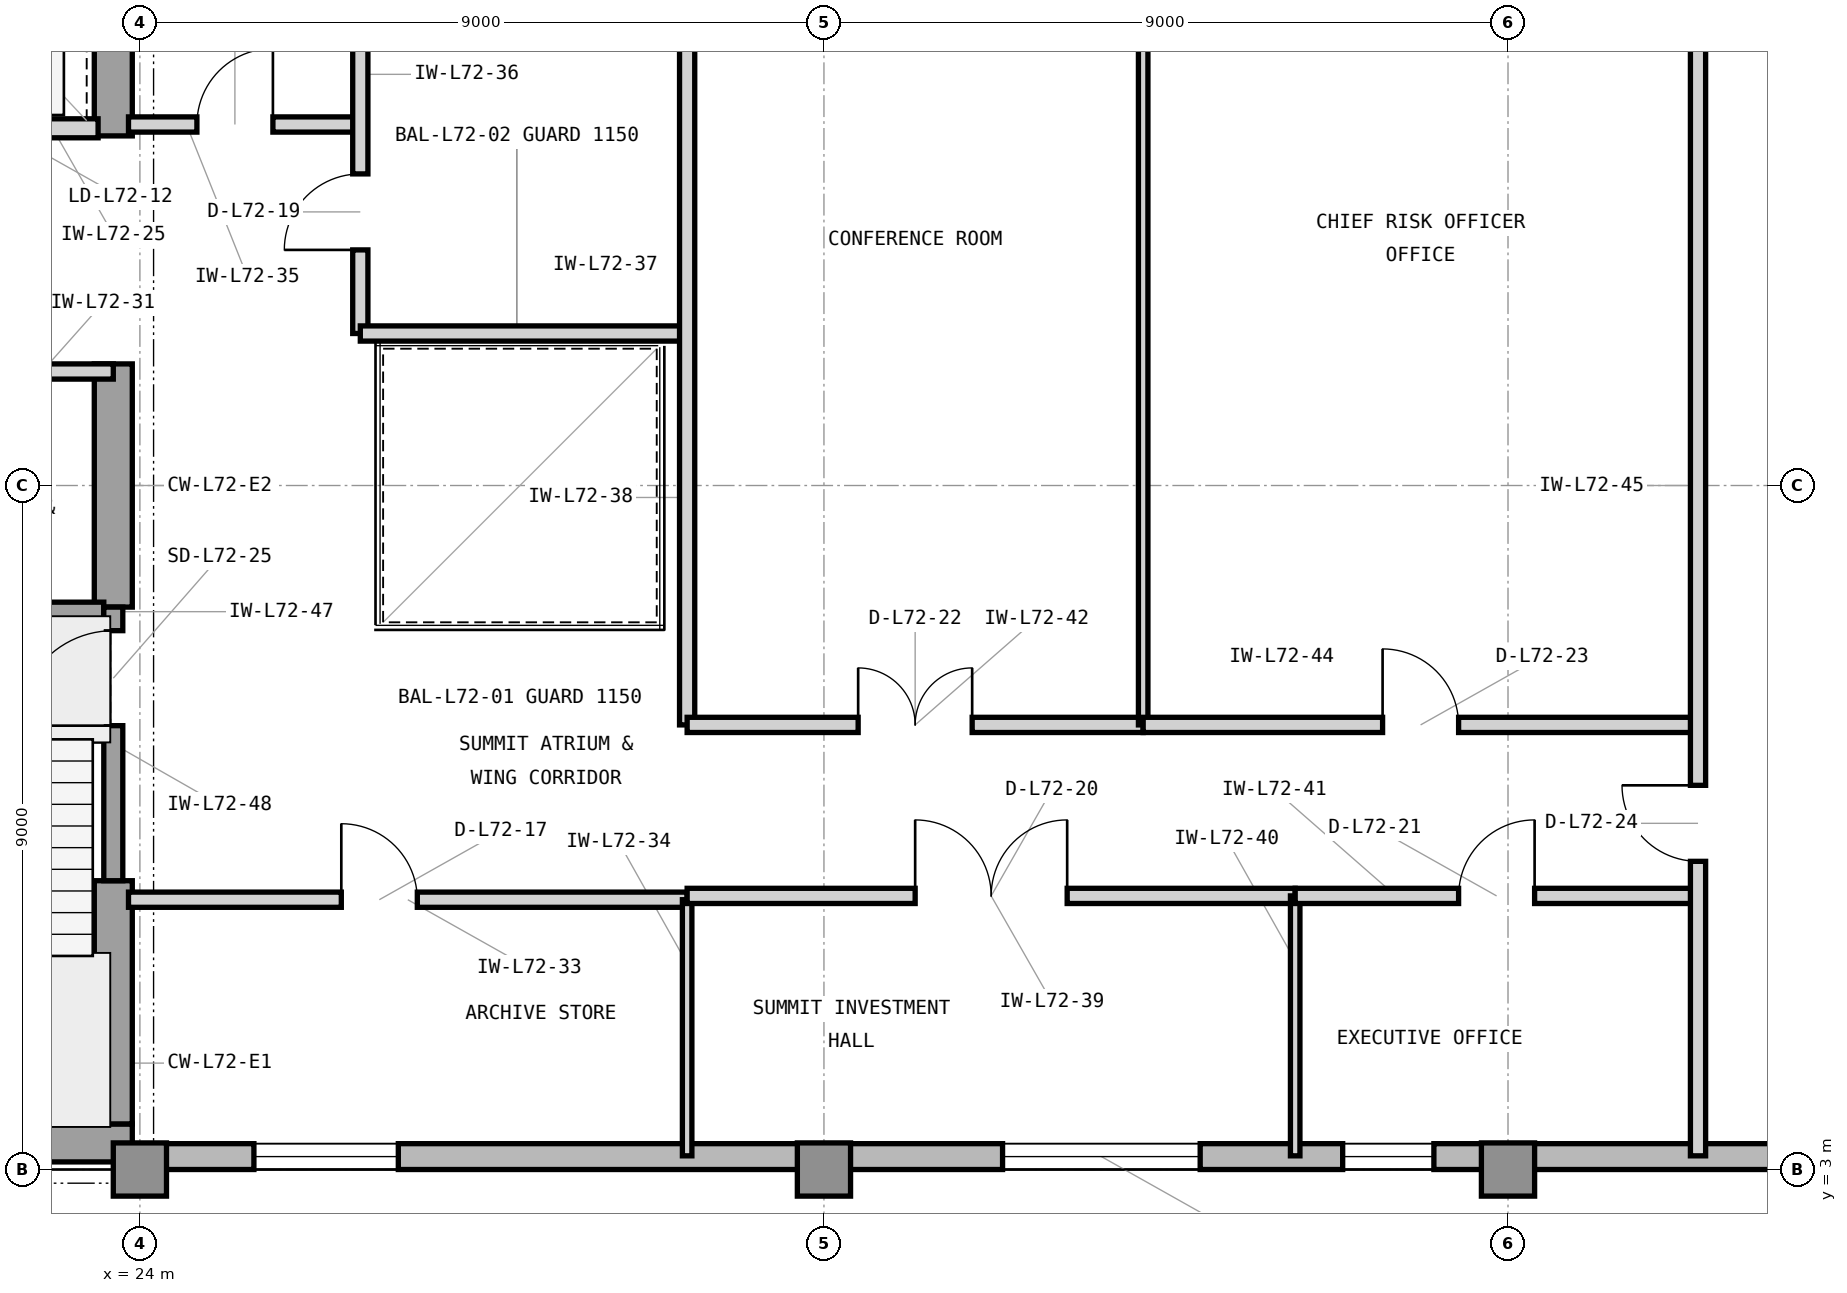
"""IFC4 building model, lengths in metres.
Left out: names, types, materials, properties, quantities, classifications, styles, units other than length and angle.
Written with IfcOpenShell. Run it as: python <this file> out.ifc"""

import sys

from ifc_helpers import new_model, si_unit, direction, frame, frame_2d, origin, origin_2d, place, context, subcontext, project, spatial, rectangle, extrude, element, fill, save


model = new_model("IFC4")
c1 = context("Model", 3, precision=1e-05, world=origin(), true_north=direction((0.0, 1.0)))
c2 = subcontext(c1, "Body", "Model", "MODEL_VIEW")
j1 = project(units=[si_unit("LENGTHUNIT", "METRE"), si_unit("PLANEANGLEUNIT", "RADIAN")], contexts=[c1])
p1 = place(None, origin())
s1 = spatial("IfcSite", under=j1, at=p1, CompositionType="ELEMENT")
p2 = place(p1, origin())
s2 = spatial("IfcBuilding", under=s1, at=p2, CompositionType="ELEMENT")
p3 = place(p2, frame((0.0, 0.0, 293.7)))
s3 = spatial("IfcBuildingStorey", under=s2, at=p3, CompositionType="ELEMENT", Elevation=293.7)
p4 = place(p3, frame((7.475, 3.35, 0.0), z_axis=(0.0, 0.0, 1.0), x_axis=(1.0, 0.0, 0.0)))
e1 = element("IfcWall", 1, at=p4, inside=s3, PredefinedType="SHEAR", context=c2, shape_type="SweptSolid", body=[
    extrude(rectangle(XDim=16.425, YDim=0.5, at=frame_2d((8.212, 0.0))), origin(), (0.0, 0.0, 1.0), 3.9),
])
p5 = place(p3, frame((23.65, 3.6, 0.0), z_axis=(0.0, 0.0, 1.0), x_axis=(0.0, 1.0, 0.0)))
e2 = element("IfcWall", 2, at=p5, inside=s3, PredefinedType="SHEAR", context=c2, shape_type="SweptSolid", body=[
    extrude(rectangle(XDim=3.2, YDim=0.5, at=frame_2d((1.6, 0.0))), origin(), (0.0, 0.0, 1.0), 3.9),
])
p6 = place(p3, frame((23.65, 10.4, 0.0), z_axis=(0.0, 0.0, 1.0), x_axis=(0.0, 1.0, 0.0)))
e3 = element("IfcWall", 3, at=p6, inside=s3, PredefinedType="SHEAR", context=c2, shape_type="SweptSolid", body=[
    extrude(rectangle(XDim=3.2, YDim=0.5, at=frame_2d((1.6, 0.0))), origin(), (0.0, 0.0, 1.0), 3.9),
])
p7 = place(p3, frame((23.65, 16.6, 0.0), z_axis=(0.0, 0.0, 1.0), x_axis=(0.0, 1.0, 0.0)))
e4 = element("IfcWall", 4, at=p7, inside=s3, PredefinedType="SHEAR", context=c2, shape_type="SweptSolid", body=[
    extrude(rectangle(XDim=4.05, YDim=0.5, at=frame_2d((2.025, 0.0))), origin(), (0.0, 0.0, 1.0), 3.9),
])
for number, where, z_axis, x_axis in (
    (5, (24.0, 3.0, 0.0), (0.0, 0.0, 1.0), (1.0, 0.0, 0.0)),
    (6, (33.0, 3.0, 0.0), (0.0, 0.0, 1.0), (1.0, 0.0, 0.0)),
    (7, (42.0, 3.0, 0.0), (0.0, 0.0, 1.0), (1.0, 0.0, 0.0)),
):
    element("IfcColumn", number, at=place(p3, frame(where, z_axis=z_axis, x_axis=x_axis)), inside=s3, PredefinedType="COLUMN", context=c2, shape_type="SweptSolid", body=[
        extrude(rectangle(XDim=0.7, YDim=0.7, at=origin_2d()), origin(), (0.0, 0.0, 1.0), 3.9),
    ])
p8 = place(p3, frame((23.9, 3.17, 0.0), z_axis=(0.0, 0.0, 1.0), x_axis=(1.0, 0.0, 0.0)))
e8 = element("IfcWall", 8, at=p8, inside=s3, PredefinedType="STANDARD", context=c2, shape_type="SweptSolid", body=[
    extrude(rectangle(XDim=25.5, YDim=0.34, at=frame_2d((12.75, 0.0))), origin(), (0.0, 0.0, 1.0), 3.715),
])
p9 = place(p8, frame((1.6, 0.0, 0.8)))
e9 = element("IfcOpeningElement", 9, at=p9, cuts=e8, PredefinedType="OPENING", context=c2, shape_type="SweptSolid", body=[
    extrude(rectangle(XDim=1.9, YDim=2.35, at=frame_2d((0.95, 1.175))), frame((0.0, 0.18, 0.0), z_axis=(0.0, -1.0, 0.0), x_axis=(1.0, 0.0, 0.0)), (0.0, 0.0, 1.0), 0.36),
])
p10 = place(p8, frame((11.45, 0.0, 0.8)))
e10 = element("IfcOpeningElement", 10, at=p10, cuts=e8, PredefinedType="OPENING", context=c2, shape_type="SweptSolid", body=[
    extrude(rectangle(XDim=2.6, YDim=2.35, at=frame_2d((1.3, 1.175))), frame((0.0, 0.18, 0.0), z_axis=(0.0, -1.0, 0.0), x_axis=(1.0, 0.0, 0.0)), (0.0, 0.0, 1.0), 0.36),
])
p11 = place(p8, frame((15.925, 0.0, 0.8)))
e11 = element("IfcOpeningElement", 11, at=p11, cuts=e8, PredefinedType="OPENING", context=c2, shape_type="SweptSolid", body=[
    extrude(rectangle(XDim=1.2, YDim=2.35, at=frame_2d((0.6, 1.175))), frame((0.0, 0.18, 0.0), z_axis=(0.0, -1.0, 0.0), x_axis=(1.0, 0.0, 0.0)), (0.0, 0.0, 1.0), 0.36),
])
p12 = place(p3, frame((21.05, 16.7, 0.0), z_axis=(0.0, 0.0, 1.0), x_axis=(1.0, 0.0, 0.0)))
e12 = element("IfcWall", 12, at=p12, inside=s3, PredefinedType="PARTITIONING", context=c2, shape_type="SweptSolid", body=[
    extrude(rectangle(XDim=2.4, YDim=0.25, at=frame_2d((1.2, 0.0))), origin(), (0.0, 0.0, 1.0), 3.354),
])
p13 = place(p12, frame((0.52, 0.0, 0.0)))
e13 = element("IfcOpeningElement", 13, at=p13, cuts=e12, PredefinedType="OPENING", context=c2, shape_type="SweptSolid", body=[
    extrude(rectangle(XDim=1.15, YDim=2.25, at=frame_2d((0.575, 1.125))), frame((0.0, 0.135, 0.0), z_axis=(0.0, -1.0, 0.0), x_axis=(1.0, 0.0, 0.0)), (0.0, 0.0, 1.0), 0.27),
])
p14 = place(p3, frame((19.9, 13.5, 0.0), z_axis=(0.0, 0.0, 1.0), x_axis=(1.0, 0.0, 0.0)))
e14 = element("IfcWall", 14, at=p14, inside=s3, PredefinedType="PARTITIONING", context=c2, shape_type="SweptSolid", body=[
    extrude(rectangle(XDim=3.75, YDim=0.2, at=frame_2d((1.875, 0.0))), origin(), (0.0, 0.0, 1.0), 3.354),
])
p15 = place(p14, frame((1.4, 0.0, 0.0)))
e15 = element("IfcOpeningElement", 15, at=p15, cuts=e14, PredefinedType="OPENING", context=c2, shape_type="SweptSolid", body=[
    extrude(rectangle(XDim=0.95, YDim=2.1, at=frame_2d((0.475, 1.05))), frame((0.0, 0.11, 0.0), z_axis=(0.0, -1.0, 0.0), x_axis=(1.0, 0.0, 0.0)), (0.0, 0.0, 1.0), 0.22),
])
p16 = place(p3, frame((23.85, 6.55, 0.0), z_axis=(0.0, 0.0, 1.0), x_axis=(1.0, 0.0, 0.0)))
e16 = element("IfcWall", 16, at=p16, inside=s3, PredefinedType="PARTITIONING", context=c2, shape_type="SweptSolid", body=[
    extrude(rectangle(XDim=7.35, YDim=0.2, at=frame_2d((3.675, 0.0))), origin(), (0.0, 0.0, 1.0), 3.705),
])
p17 = place(p16, frame((2.8, 0.0, 0.0)))
e17 = element("IfcOpeningElement", 17, at=p17, cuts=e16, PredefinedType="OPENING", context=c2, shape_type="SweptSolid", body=[
    extrude(rectangle(XDim=1.0, YDim=2.15, at=frame_2d((0.5, 1.075))), frame((0.0, 0.11, 0.0), z_axis=(0.0, -1.0, 0.0), x_axis=(1.0, 0.0, 0.0)), (0.0, 0.0, 1.0), 0.22),
])
p18 = place(p3, frame((31.2, 3.18, 0.0), z_axis=(0.0, 0.0, 1.0), x_axis=(0.0, 1.0, 0.0)))
e18 = element("IfcWall", 18, at=p18, inside=s3, PredefinedType="PARTITIONING", context=c2, shape_type="SweptSolid", body=[
    extrude(rectangle(XDim=3.37, YDim=0.125, at=frame_2d((1.685, 0.0))), origin(), (0.0, 0.0, 1.0), 3.705),
])
p19 = place(p3, frame((23.85, 16.75, 0.0), z_axis=(0.0, 0.0, 1.0), x_axis=(1.0, 0.0, 0.0)))
e19 = element("IfcWall", 19, at=p19, inside=s3, PredefinedType="PARTITIONING", context=c2, shape_type="SweptSolid", body=[
    extrude(rectangle(XDim=3.05, YDim=0.2, at=frame_2d((1.525, 0.0))), origin(), (0.0, 0.0, 1.0), 3.705),
])
p20 = place(p19, frame((0.9, 0.0, 0.0)))
e20 = element("IfcOpeningElement", 20, at=p20, cuts=e19, PredefinedType="OPENING", context=c2, shape_type="SweptSolid", body=[
    extrude(rectangle(XDim=1.0, YDim=2.15, at=frame_2d((0.5, 1.075))), frame((0.0, 0.11, 0.0), z_axis=(0.0, -1.0, 0.0), x_axis=(1.0, 0.0, 0.0)), (0.0, 0.0, 1.0), 0.22),
])
p21 = place(p3, frame((26.9, 14.0, 0.0), z_axis=(0.0, 0.0, 1.0), x_axis=(0.0, 1.0, 0.0)))
e21 = element("IfcWall", 21, at=p21, inside=s3, PredefinedType="PARTITIONING", context=c2, shape_type="SweptSolid", body=[
    extrude(rectangle(XDim=6.82, YDim=0.2, at=frame_2d((3.41, 0.0))), origin(), (0.0, 0.0, 1.0), 3.705),
])
p22 = place(p21, frame((1.1, 0.0, 0.0)))
e22 = element("IfcOpeningElement", 22, at=p22, cuts=e21, PredefinedType="OPENING", context=c2, shape_type="SweptSolid", body=[
    extrude(rectangle(XDim=1.0, YDim=2.15, at=frame_2d((0.5, 1.075))), frame((0.0, 0.11, 0.0), z_axis=(0.0, -1.0, 0.0), x_axis=(1.0, 0.0, 0.0)), (0.0, 0.0, 1.0), 0.22),
])
p23 = place(p3, frame((26.9, 14.0, 0.0), z_axis=(0.0, 0.0, 1.0), x_axis=(1.0, 0.0, 0.0)))
e23 = element("IfcWall", 23, at=p23, inside=s3, PredefinedType="PARTITIONING", context=c2, shape_type="SweptSolid", body=[
    extrude(rectangle(XDim=4.3, YDim=0.2, at=frame_2d((2.15, 0.0))), origin(), (0.0, 0.0, 1.0), 3.705),
])
p24 = place(p3, frame((31.2, 8.85, 0.0), z_axis=(0.0, 0.0, 1.0), x_axis=(0.0, 1.0, 0.0)))
e24 = element("IfcWall", 24, at=p24, inside=s3, PredefinedType="PARTITIONING", context=c2, shape_type="SweptSolid", body=[
    extrude(rectangle(XDim=11.97, YDim=0.2, at=frame_2d((5.985, 0.0))), origin(), (0.0, 0.0, 1.0), 3.705),
])
p25 = place(p3, frame((31.2, 6.6, 0.0), z_axis=(0.0, 0.0, 1.0), x_axis=(1.0, 0.0, 0.0)))
e25 = element("IfcWall", 25, at=p25, inside=s3, PredefinedType="PARTITIONING", context=c2, shape_type="SweptSolid", body=[
    extrude(rectangle(XDim=8.0, YDim=0.2, at=frame_2d((4.0, 0.0))), origin(), (0.0, 0.0, 1.0), 3.705),
])
p26 = place(p25, frame((3.0, 0.0, 0.0)))
e26 = element("IfcOpeningElement", 26, at=p26, cuts=e25, PredefinedType="OPENING", context=c2, shape_type="SweptSolid", body=[
    extrude(rectangle(XDim=2.0, YDim=2.5, at=frame_2d((1.0, 1.25))), frame((0.0, 0.11, 0.0), z_axis=(0.0, -1.0, 0.0), x_axis=(1.0, 0.0, 0.0)), (0.0, 0.0, 1.0), 0.22),
])
p27 = place(p3, frame((39.2, 3.18, 0.0), z_axis=(0.0, 0.0, 1.0), x_axis=(0.0, 1.0, 0.0)))
e27 = element("IfcWall", 27, at=p27, inside=s3, PredefinedType="PARTITIONING", context=c2, shape_type="SweptSolid", body=[
    extrude(rectangle(XDim=3.42, YDim=0.125, at=frame_2d((1.71, 0.0))), origin(), (0.0, 0.0, 1.0), 3.705),
])
p28 = place(p3, frame((39.2, 6.6, 0.0), z_axis=(0.0, 0.0, 1.0), x_axis=(1.0, 0.0, 0.0)))
e28 = element("IfcWall", 28, at=p28, inside=s3, PredefinedType="PARTITIONING", context=c2, shape_type="SweptSolid", body=[
    extrude(rectangle(XDim=5.3, YDim=0.2, at=frame_2d((2.65, 0.0))), origin(), (0.0, 0.0, 1.0), 3.705),
])
p29 = place(p28, frame((2.15, 0.0, 0.0)))
e29 = element("IfcOpeningElement", 29, at=p29, cuts=e28, PredefinedType="OPENING", context=c2, shape_type="SweptSolid", body=[
    extrude(rectangle(XDim=1.0, YDim=2.15, at=frame_2d((0.5, 1.075))), frame((0.0, 0.11, 0.0), z_axis=(0.0, -1.0, 0.0), x_axis=(1.0, 0.0, 0.0)), (0.0, 0.0, 1.0), 0.22),
])
p30 = place(p3, frame((31.2, 8.85, 0.0), z_axis=(0.0, 0.0, 1.0), x_axis=(1.0, 0.0, 0.0)))
e30 = element("IfcWall", 30, at=p30, inside=s3, PredefinedType="PARTITIONING", context=c2, shape_type="SweptSolid", body=[
    extrude(rectangle(XDim=6.0, YDim=0.2, at=frame_2d((3.0, 0.0))), origin(), (0.0, 0.0, 1.0), 3.705),
])
p31 = place(p30, frame((2.25, 0.0, 0.0)))
e31 = element("IfcOpeningElement", 31, at=p31, cuts=e30, PredefinedType="OPENING", context=c2, shape_type="SweptSolid", body=[
    extrude(rectangle(XDim=1.5, YDim=2.3, at=frame_2d((0.75, 1.15))), frame((0.0, 0.11, 0.0), z_axis=(0.0, -1.0, 0.0), x_axis=(1.0, 0.0, 0.0)), (0.0, 0.0, 1.0), 0.22),
])
p32 = place(p3, frame((37.2, 8.85, 0.0), z_axis=(0.0, 0.0, 1.0), x_axis=(0.0, 1.0, 0.0)))
e32 = element("IfcWall", 32, at=p32, inside=s3, PredefinedType="PARTITIONING", context=c2, shape_type="SweptSolid", body=[
    extrude(rectangle(XDim=11.97, YDim=0.125, at=frame_2d((5.985, 0.0))), origin(), (0.0, 0.0, 1.0), 3.705),
])
p33 = place(p3, frame((37.2, 8.85, 0.0), z_axis=(0.0, 0.0, 1.0), x_axis=(1.0, 0.0, 0.0)))
e33 = element("IfcWall", 33, at=p33, inside=s3, PredefinedType="PARTITIONING", context=c2, shape_type="SweptSolid", body=[
    extrude(rectangle(XDim=7.3, YDim=0.2, at=frame_2d((3.65, 0.0))), origin(), (0.0, 0.0, 1.0), 3.705),
])
p34 = place(p33, frame((3.15, 0.0, 0.0)))
e34 = element("IfcOpeningElement", 34, at=p34, cuts=e33, PredefinedType="OPENING", context=c2, shape_type="SweptSolid", body=[
    extrude(rectangle(XDim=1.0, YDim=2.15, at=frame_2d((0.5, 1.075))), frame((0.0, 0.11, 0.0), z_axis=(0.0, -1.0, 0.0), x_axis=(1.0, 0.0, 0.0)), (0.0, 0.0, 1.0), 0.22),
])
p35 = place(p3, frame((44.5, 3.18, 0.0), z_axis=(0.0, 0.0, 1.0), x_axis=(0.0, 1.0, 0.0)))
e35 = element("IfcWall", 35, at=p35, inside=s3, PredefinedType="PARTITIONING", context=c2, shape_type="SweptSolid", body=[
    extrude(rectangle(XDim=17.64, YDim=0.2, at=frame_2d((8.82, 0.0))), origin(), (0.0, 0.0, 1.0), 3.705),
])
p36 = place(p35, frame((3.875, 0.0, 0.0)))
e36 = element("IfcOpeningElement", 36, at=p36, cuts=e35, PredefinedType="OPENING", context=c2, shape_type="SweptSolid", body=[
    extrude(rectangle(XDim=1.0, YDim=2.15, at=frame_2d((0.5, 1.075))), frame((0.0, 0.11, 0.0), z_axis=(0.0, -1.0, 0.0), x_axis=(1.0, 0.0, 0.0)), (0.0, 0.0, 1.0), 0.22),
])
p37 = place(p3, frame((19.705, 10.34, 0.0), z_axis=(0.0, 0.0, 1.0), x_axis=(1.0, 0.0, 0.0)))
e37 = element("IfcWall", 37, at=p37, inside=s3, PredefinedType="SHEAR", context=c2, shape_type="SweptSolid", body=[
    extrude(rectangle(XDim=3.82, YDim=0.25, at=frame_2d((1.91, 0.0))), origin(), (0.0, 0.0, 1.0), 3.9),
])
p38 = place(p3, frame((23.65, 6.8, 0.0), z_axis=(0.0, 0.0, 1.0), x_axis=(0.0, 1.0, 0.0)))
e38 = element("IfcWall", 38, at=p38, inside=s3, PredefinedType="SHEAR", context=c2, shape_type="SweptSolid", body=[
    extrude(rectangle(XDim=3.6, YDim=0.25, at=frame_2d((1.8, 0.0))), origin(), (0.0, 0.0, 1.0), 3.9),
])
p39 = place(p38, frame((2.04, 0.0, 0.0)))
e39 = element("IfcOpeningElement", 39, at=p39, cuts=e38, PredefinedType="OPENING", context=c2, shape_type="SweptSolid", body=[
    extrude(rectangle(XDim=1.25, YDim=2.2, at=frame_2d((0.625, 1.1))), frame((0.0, 0.135, 0.0), z_axis=(0.0, -1.0, 0.0), x_axis=(1.0, 0.0, 0.0)), (0.0, 0.0, 1.0), 0.27),
])
p40 = place(p9, origin())
e40 = element("IfcWindow", 40, at=p40, inside=s3, PartitioningType="SINGLE_PANEL", PredefinedType="WINDOW", context=c2, shape_type="SweptSolid", body=[
    extrude(rectangle(XDim=1.9, YDim=2.35, at=frame_2d((0.95, 1.175))), frame((0.0, 0.11, 0.0), z_axis=(0.0, -1.0, 0.0), x_axis=(1.0, 0.0, 0.0)), (0.0, 0.0, 1.0), 0.06),
])
fill(e9, e40)
p41 = place(p10, origin())
e41 = element("IfcWindow", 41, at=p41, inside=s3, PartitioningType="SINGLE_PANEL", PredefinedType="WINDOW", context=c2, shape_type="SweptSolid", body=[
    extrude(rectangle(XDim=2.6, YDim=2.35, at=frame_2d((1.3, 1.175))), frame((0.0, 0.11, 0.0), z_axis=(0.0, -1.0, 0.0), x_axis=(1.0, 0.0, 0.0)), (0.0, 0.0, 1.0), 0.06),
])
fill(e10, e41)
p42 = place(p17, origin())
e42 = element("IfcDoor", 42, at=p42, inside=s3, OperationType="SINGLE_SWING_LEFT", PredefinedType="DOOR", context=c2, shape_type="SweptSolid", body=[
    extrude(rectangle(XDim=1.0, YDim=2.15, at=frame_2d((0.5, 1.075))), frame((0.0, 0.025, 0.0), z_axis=(0.0, -1.0, 0.0), x_axis=(1.0, 0.0, 0.0)), (0.0, 0.0, 1.0), 0.05),
])
fill(e17, e42)
p43 = place(p20, origin())
e43 = element("IfcDoor", 43, at=p43, inside=s3, OperationType="SINGLE_SWING_RIGHT", PredefinedType="DOOR", context=c2, shape_type="SweptSolid", body=[
    extrude(rectangle(XDim=1.0, YDim=2.15, at=frame_2d((0.5, 1.075))), frame((0.0, 0.025, 0.0), z_axis=(0.0, -1.0, 0.0), x_axis=(1.0, 0.0, 0.0)), (0.0, 0.0, 1.0), 0.05),
])
fill(e20, e43)
p44 = place(p22, origin())
e44 = element("IfcDoor", 44, at=p44, inside=s3, OperationType="SINGLE_SWING_LEFT", PredefinedType="DOOR", context=c2, shape_type="SweptSolid", body=[
    extrude(rectangle(XDim=1.0, YDim=2.15, at=frame_2d((0.5, 1.075))), frame((0.0, 0.025, 0.0), z_axis=(0.0, -1.0, 0.0), x_axis=(1.0, 0.0, 0.0)), (0.0, 0.0, 1.0), 0.05),
])
fill(e22, e44)
p45 = place(p26, origin())
e45 = element("IfcDoor", 45, at=p45, inside=s3, OperationType="DOUBLE_DOOR_SINGLE_SWING", PredefinedType="DOOR", context=c2, shape_type="SweptSolid", body=[
    extrude(rectangle(XDim=2.0, YDim=2.5, at=frame_2d((1.0, 1.25))), frame((0.0, 0.025, 0.0), z_axis=(0.0, -1.0, 0.0), x_axis=(1.0, 0.0, 0.0)), (0.0, 0.0, 1.0), 0.05),
])
fill(e26, e45)
p46 = place(p29, origin())
e46 = element("IfcDoor", 46, at=p46, inside=s3, OperationType="SINGLE_SWING_RIGHT", PredefinedType="DOOR", context=c2, shape_type="SweptSolid", body=[
    extrude(rectangle(XDim=1.0, YDim=2.15, at=frame_2d((0.5, 1.075))), frame((0.0, 0.025, 0.0), z_axis=(0.0, -1.0, 0.0), x_axis=(1.0, 0.0, 0.0)), (0.0, 0.0, 1.0), 0.05),
])
fill(e29, e46)
p47 = place(p31, origin())
e47 = element("IfcDoor", 47, at=p47, inside=s3, OperationType="DOUBLE_DOOR_SINGLE_SWING", PredefinedType="DOOR", context=c2, shape_type="SweptSolid", body=[
    extrude(rectangle(XDim=1.5, YDim=2.3, at=frame_2d((0.75, 1.15))), frame((0.0, 0.025, 0.0), z_axis=(0.0, -1.0, 0.0), x_axis=(1.0, 0.0, 0.0)), (0.0, 0.0, 1.0), 0.05),
])
fill(e31, e47)
p48 = place(p34, origin())
e48 = element("IfcDoor", 48, at=p48, inside=s3, OperationType="SINGLE_SWING_LEFT", PredefinedType="DOOR", context=c2, shape_type="SweptSolid", body=[
    extrude(rectangle(XDim=1.0, YDim=2.15, at=frame_2d((0.5, 1.075))), frame((0.0, 0.025, 0.0), z_axis=(0.0, -1.0, 0.0), x_axis=(1.0, 0.0, 0.0)), (0.0, 0.0, 1.0), 0.05),
])
fill(e34, e48)
p49 = place(p36, origin())
e49 = element("IfcDoor", 49, at=p49, inside=s3, OperationType="SINGLE_SWING_RIGHT", PredefinedType="DOOR", context=c2, shape_type="SweptSolid", body=[
    extrude(rectangle(XDim=1.0, YDim=2.15, at=frame_2d((0.5, 1.075))), frame((0.0, 0.025, 0.0), z_axis=(0.0, -1.0, 0.0), x_axis=(1.0, 0.0, 0.0)), (0.0, 0.0, 1.0), 0.05),
])
fill(e36, e49)
p50 = place(p39, origin())
e50 = element("IfcDoor", 50, at=p50, inside=s3, OperationType="SINGLE_SWING_LEFT", PredefinedType="DOOR", context=c2, shape_type="SweptSolid", body=[
    extrude(rectangle(XDim=1.25, YDim=2.2, at=frame_2d((0.625, 1.1))), frame((0.0, 0.025, 0.0), z_axis=(0.0, -1.0, 0.0), x_axis=(1.0, 0.0, 0.0)), (0.0, 0.0, 1.0), 0.05),
])
fill(e39, e50)
p51 = place(p11, origin())
e51 = element("IfcWindow", 51, at=p51, inside=s3, PartitioningType="SINGLE_PANEL", PredefinedType="WINDOW", context=c2, shape_type="SweptSolid", body=[
    extrude(rectangle(XDim=1.2, YDim=2.35, at=frame_2d((0.6, 1.175))), frame((0.0, 0.11, 0.0), z_axis=(0.0, -1.0, 0.0), x_axis=(1.0, 0.0, 0.0)), (0.0, 0.0, 1.0), 0.06),
])
fill(e11, e51)
save(model, sys.argv[1])
